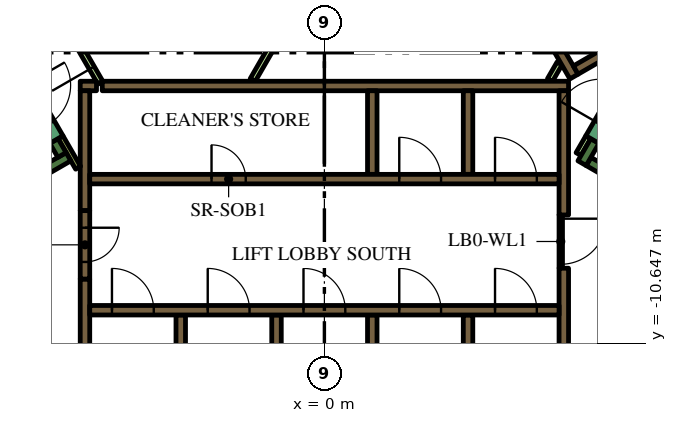
"""IFC4 building model, lengths in metres.
Left out: names, types, materials, properties, quantities, classifications, styles, units other than length and angle.
Written with IfcOpenShell. Run it as: python <this file> out.ifc"""

import sys

from ifc_helpers import new_model, si_unit, direction, frame, frame_2d, origin, place, context, subcontext, project, spatial, polyline, rectangle, outline, extrude, element, fill, save


model = new_model("IFC4")
c1 = context("Model", 3, precision=1e-05, world=origin(), true_north=direction((0.0, 1.0)))
c2 = subcontext(c1, "Body", "Model", "MODEL_VIEW")
j1 = project(units=[si_unit("LENGTHUNIT", "METRE"), si_unit("PLANEANGLEUNIT", "RADIAN")], contexts=[c1])
p1 = place(None, origin())
s1 = spatial("IfcSite", under=j1, at=p1, CompositionType="ELEMENT")
p2 = place(p1, origin())
s2 = spatial("IfcBuilding", under=s1, at=p2, CompositionType="ELEMENT")
p3 = place(p2, frame((0.0, 0.0, 83.7)))
s3 = spatial("IfcBuildingStorey", under=s2, at=p3, CompositionType="ELEMENT", Elevation=83.7)
p4 = place(p3, frame((6.776, 13.364, 0.0), z_axis=(0.0, 0.0, 1.0), x_axis=(0.500004177138, -0.8660229921, 0.0)))
e1 = element("IfcWall", 1, at=p4, inside=s3, PredefinedType="SOLIDWALL", context=c2, shape_type="SweptSolid", body=[
    extrude(rectangle(XDim=20.204, YDim=0.9, at=frame_2d((10.102, 0.0))), origin(), (0.0, 0.0, 1.0), 3.9),
])
p5 = place(p3, frame((12.84, -9.261, 0.0), z_axis=(0.0, 0.0, 1.0), x_axis=(-0.866013990052, 0.500019768644, 0.0)))
e2 = element("IfcWall", 2, at=p5, inside=s3, PredefinedType="SOLIDWALL", context=c2, shape_type="SweptSolid", body=[
    extrude(rectangle(XDim=6.8, YDim=0.25, at=frame_2d((3.4, 0.0))), origin(), (0.0, 0.0, 1.0), 3.9),
])
p6 = place(p3, frame((6.78, -5.906, 0.0), z_axis=(0.0, 0.0, 1.0), x_axis=(0.500223362819, 0.865896406789, 0.0)))
e3 = element("IfcWall", 3, at=p6, inside=s3, PredefinedType="SOLIDWALL", context=c2, shape_type="SweptSolid", body=[
    extrude(rectangle(XDim=0.675, YDim=0.25, at=frame_2d((0.337, 0.0))), origin(), (0.0, 0.0, 1.0), 3.9),
])
p7 = place(p3, frame((-12.84, -9.261, 0.0), z_axis=(0.0, 0.0, 1.0), x_axis=(0.866016039709, 0.500016218704, 0.0)))
e4 = element("IfcWall", 4, at=p7, inside=s3, PredefinedType="SOLIDWALL", context=c2, shape_type="SweptSolid", body=[
    extrude(rectangle(XDim=7.05, YDim=0.25, at=frame_2d((3.525, 0.0))), origin(), (0.0, 0.0, 1.0), 3.9),
])
p8 = place(p3, frame((-6.905, -5.69, 0.0), z_axis=(0.0, 0.0, 1.0), x_axis=(-0.500402024738, 0.865793170242, 0.0)))
e5 = element("IfcWall", 5, at=p8, inside=s3, PredefinedType="SOLIDWALL", context=c2, shape_type="SweptSolid", body=[
    extrude(rectangle(XDim=0.425, YDim=0.25, at=frame_2d((0.212, 0.0))), origin(), (0.0, 0.0, 1.0), 3.9),
])
p9 = place(p3, frame((-3.78, -12.1, 0.0), z_axis=(0.0, 0.0, 1.0), x_axis=(0.0, 1.0, 0.0)))
e6 = element("IfcWall", 6, at=p9, inside=s3, PredefinedType="SOLIDWALL", context=c2, shape_type="SweptSolid", body=[
    extrude(rectangle(XDim=2.2, YDim=0.25, at=frame_2d((1.1, 0.0))), origin(), (0.0, 0.0, 1.0), 3.9),
])
p10 = place(p3, frame((-6.3, -12.1, 0.0), z_axis=(0.0, 0.0, 1.0), x_axis=(0.0, 1.0, 0.0)))
e7 = element("IfcWall", 7, at=p10, inside=s3, PredefinedType="SOLIDWALL", context=c2, shape_type="SweptSolid", body=[
    extrude(rectangle(XDim=3.146, YDim=0.25, at=frame_2d((1.573, 0.0))), origin(), (0.0, 0.0, 1.0), 3.9),
])
p11 = place(p3, frame((-5.845, -3.875, 0.0), z_axis=(0.0, 0.0, 1.0), x_axis=(1.0, 0.0, 0.0)))
e8 = element("IfcWall", 8, at=p11, inside=s3, PredefinedType="SOLIDWALL", context=c2, shape_type="SweptSolid", body=[
    extrude(rectangle(XDim=12.27, YDim=0.25, at=frame_2d((6.135, 0.0))), origin(), (0.0, 0.0, 1.0), 3.9),
])
p12 = place(p3, frame((-6.425, -3.875, 0.0), z_axis=(0.0, 0.0, 1.0), x_axis=(1.0, 0.0, 0.0)))
e9 = element("IfcWall", 9, at=p12, inside=s3, PredefinedType="SOLIDWALL", context=c2, shape_type="SweptSolid", body=[
    extrude(rectangle(XDim=0.428, YDim=0.25, at=frame_2d((0.214, 0.0))), origin(), (0.0, 0.0, 1.0), 3.9),
])
p13 = place(p3, frame((6.3, -8.67, 0.0), z_axis=(0.0, 0.0, 1.0), x_axis=(0.0, -1.0, 0.0)))
e10 = element("IfcWall", 10, at=p13, inside=s3, PredefinedType="SOLIDWALL", context=c2, shape_type="SweptSolid", body=[
    extrude(rectangle(XDim=3.43, YDim=0.25, at=frame_2d((1.715, 0.0))), origin(), (0.0, 0.0, 1.0), 3.9),
])
p14 = place(p3, frame((6.3, -7.268, 0.0), z_axis=(0.0, 0.0, 1.0), x_axis=(0.0, 1.0, 0.0)))
e11 = element("IfcWall", 11, at=p14, inside=s3, PredefinedType="SOLIDWALL", context=c2, shape_type="SweptSolid", body=[
    extrude(rectangle(XDim=3.268, YDim=0.25, at=frame_2d((1.634, 0.0))), origin(), (0.0, 0.0, 1.0), 3.9),
])
for number, where, z_axis, x_axis in (
    (12, (3.78, -4.0, 0.0), (0.0, 0.0, 1.0), (0.0, -1.0, 0.0)),
    (13, (1.26, -4.0, 0.0), (0.0, 0.0, 1.0), (0.0, -1.0, 0.0)),
):
    element("IfcWall", number, at=place(p3, frame(where, z_axis=z_axis, x_axis=x_axis)), inside=s3, PredefinedType="SOLIDWALL", context=c2, shape_type="SweptSolid", body=[
        extrude(rectangle(XDim=2.2, YDim=0.25, at=frame_2d((1.1, 0.0))), origin(), (0.0, 0.0, 1.0), 3.9),
    ])
p15 = place(p3, frame((-6.3, -4.0, 0.0), z_axis=(0.0, 0.0, 1.0), x_axis=(0.0, -1.0, 0.0)))
e14 = element("IfcWall", 14, at=p15, inside=s3, PredefinedType="SOLIDWALL", context=c2, shape_type="SweptSolid", body=[
    extrude(rectangle(XDim=3.154, YDim=0.25, at=frame_2d((1.577, 0.0))), origin(), (0.0, 0.0, 1.0), 3.9),
])
for number, where, z_axis, x_axis in (
    (15, (3.78, -12.1, 0.0), (0.0, 0.0, 1.0), (0.0, 1.0, 0.0)),
    (16, (1.26, -12.1, 0.0), (0.0, 0.0, 1.0), (0.0, 1.0, 0.0)),
    (17, (-1.26, -12.1, 0.0), (0.0, 0.0, 1.0), (0.0, 1.0, 0.0)),
):
    element("IfcWall", number, at=place(p3, frame(where, z_axis=z_axis, x_axis=x_axis)), inside=s3, PredefinedType="SOLIDWALL", context=c2, shape_type="SweptSolid", body=[
        extrude(rectangle(XDim=2.2, YDim=0.25, at=frame_2d((1.1, 0.0))), origin(), (0.0, 0.0, 1.0), 3.9),
    ])
p16 = place(p3, origin())
e18 = element("IfcWall", 18, at=p16, inside=s3, PredefinedType="SOLIDWALL", context=c2, shape_type="SweptSolid", body=[
    extrude(outline(polyline([(0.335, 6.925), (0.335, 7.075), (0.335, 7.075), (0.335, 7.075), (0.245, 7.075), (0.079, 7.363), (0.035, 7.439), (0.252, 7.564), (0.377, 7.348), (6.552, -3.348), (6.677, -3.564), (6.46, -3.689), (4.897, -0.981), (0.332, 6.925), (0.335, 6.925), (0.335, 6.925), (0.335, 6.925)])), origin(), (0.0, 0.0, 1.0), 3.9),
])
p17 = place(p3, frame((6.614, -3.456, 0.0), z_axis=(0.0, 0.0, 1.0), x_axis=(0.86602447079, 0.500001615989, 0.0)))
e19 = element("IfcWall", 19, at=p17, inside=s3, PredefinedType="SOLIDWALL", context=c2, shape_type="SweptSolid", body=[
    extrude(rectangle(XDim=3.154, YDim=0.25, at=frame_2d((1.577, 0.0))), origin(), (0.0, 0.0, 1.0), 3.9),
])
p18 = place(p3, frame((-6.48, -6.027, 0.0), z_axis=(0.0, 0.0, 1.0), x_axis=(-0.499927229454, 0.866067413802, 0.0)))
e20 = element("IfcWall", 20, at=p18, inside=s3, PredefinedType="PARTITIONING", context=c2, shape_type="SweptSolid", body=[
    extrude(rectangle(XDim=0.929, YDim=0.15, at=frame_2d((0.464, 0.0))), origin(), (0.0, 0.0, 1.0), 3.9),
])
p19 = place(p3, frame((6.945, -5.222, 0.0), z_axis=(0.0, 0.0, 1.0), x_axis=(-0.499818422106, -0.866130212453, 0.0)))
e21 = element("IfcWall", 21, at=p19, inside=s3, PredefinedType="PARTITIONING", context=c2, shape_type="SweptSolid", body=[
    extrude(rectangle(XDim=0.514, YDim=0.15, at=frame_2d((0.257, 0.0))), origin(), (0.0, 0.0, 1.0), 2.75),
])
p20 = place(p3, frame((5.936, -3.718, 0.0), z_axis=(0.0, 0.0, 1.0), x_axis=(0.499890179513, 0.866088799389, 0.0)))
e22 = element("IfcWall", 22, at=p20, inside=s3, PredefinedType="PARTITIONING", context=c2, shape_type="SweptSolid", body=[
    extrude(rectangle(XDim=0.504, YDim=0.15, at=frame_2d((0.252, 0.0))), origin(), (0.0, 0.0, 1.0), 2.75),
])
p21 = place(p3, frame((-1.887, -3.718, 0.0), z_axis=(0.0, 0.0, 1.0), x_axis=(0.500033287521, 0.866006184372, 0.0)))
e23 = element("IfcWall", 23, at=p21, inside=s3, PredefinedType="PARTITIONING", context=c2, shape_type="SweptSolid", body=[
    extrude(rectangle(XDim=3.263, YDim=0.15, at=frame_2d((1.632, 0.0))), origin(), (0.0, 0.0, 1.0), 2.75),
])
p22 = place(p3, frame((-6.175, -9.775, 0.0), z_axis=(0.0, 0.0, 1.0), x_axis=(1.0, 0.0, 0.0)))
e24 = element("IfcWall", 24, at=p22, inside=s3, PredefinedType="SOLIDWALL", context=c2, shape_type="SweptSolid", body=[
    extrude(rectangle(XDim=12.35, YDim=0.25, at=frame_2d((6.175, 0.0))), origin(), (0.0, 0.0, 1.0), 3.9),
])
p23 = place(p22, frame((0.585, 0.0, 0.0)))
e25 = element("IfcOpeningElement", 25, at=p23, cuts=e24, PredefinedType="OPENING", context=c2, shape_type="SweptSolid", body=[
    extrude(rectangle(XDim=1.1, YDim=2.1, at=frame_2d((0.55, 1.05))), frame((0.0, 0.135, 0.0), z_axis=(0.0, -1.0, 0.0), x_axis=(1.0, 0.0, 0.0)), (0.0, 0.0, 1.0), 0.27),
])
p24 = place(p22, frame((3.105, 0.0, 0.0)))
e26 = element("IfcOpeningElement", 26, at=p24, cuts=e24, PredefinedType="OPENING", context=c2, shape_type="SweptSolid", body=[
    extrude(rectangle(XDim=1.1, YDim=2.1, at=frame_2d((0.55, 1.05))), frame((0.0, 0.135, 0.0), z_axis=(0.0, -1.0, 0.0), x_axis=(1.0, 0.0, 0.0)), (0.0, 0.0, 1.0), 0.27),
])
p25 = place(p22, frame((5.625, 0.0, 0.0)))
e27 = element("IfcOpeningElement", 27, at=p25, cuts=e24, PredefinedType="OPENING", context=c2, shape_type="SweptSolid", body=[
    extrude(rectangle(XDim=1.1, YDim=2.1, at=frame_2d((0.55, 1.05))), frame((0.0, 0.135, 0.0), z_axis=(0.0, -1.0, 0.0), x_axis=(1.0, 0.0, 0.0)), (0.0, 0.0, 1.0), 0.27),
])
p26 = place(p22, frame((8.145, 0.0, 0.0)))
e28 = element("IfcOpeningElement", 28, at=p26, cuts=e24, PredefinedType="OPENING", context=c2, shape_type="SweptSolid", body=[
    extrude(rectangle(XDim=1.1, YDim=2.1, at=frame_2d((0.55, 1.05))), frame((0.0, 0.135, 0.0), z_axis=(0.0, -1.0, 0.0), x_axis=(1.0, 0.0, 0.0)), (0.0, 0.0, 1.0), 0.27),
])
p27 = place(p22, frame((10.665, 0.0, 0.0)))
e29 = element("IfcOpeningElement", 29, at=p27, cuts=e24, PredefinedType="OPENING", context=c2, shape_type="SweptSolid", body=[
    extrude(rectangle(XDim=1.1, YDim=2.1, at=frame_2d((0.55, 1.05))), frame((0.0, 0.135, 0.0), z_axis=(0.0, -1.0, 0.0), x_axis=(1.0, 0.0, 0.0)), (0.0, 0.0, 1.0), 0.27),
])
p28 = place(p3, frame((-6.175, -6.325, 0.0), z_axis=(0.0, 0.0, 1.0), x_axis=(1.0, 0.0, 0.0)))
e30 = element("IfcWall", 30, at=p28, inside=s3, PredefinedType="SOLIDWALL", context=c2, shape_type="SweptSolid", body=[
    extrude(rectangle(XDim=12.35, YDim=0.25, at=frame_2d((6.175, 0.0))), origin(), (0.0, 0.0, 1.0), 3.9),
])
p29 = place(p28, frame((3.205, 0.0, 0.0)))
e31 = element("IfcOpeningElement", 31, at=p29, cuts=e30, PredefinedType="OPENING", context=c2, shape_type="SweptSolid", body=[
    extrude(rectangle(XDim=0.9, YDim=2.1, at=frame_2d((0.45, 1.05))), frame((0.0, 0.135, 0.0), z_axis=(0.0, -1.0, 0.0), x_axis=(1.0, 0.0, 0.0)), (0.0, 0.0, 1.0), 0.27),
])
p30 = place(p28, frame((8.145, 0.0, 0.0)))
e32 = element("IfcOpeningElement", 32, at=p30, cuts=e30, PredefinedType="OPENING", context=c2, shape_type="SweptSolid", body=[
    extrude(rectangle(XDim=1.1, YDim=2.1, at=frame_2d((0.55, 1.05))), frame((0.0, 0.135, 0.0), z_axis=(0.0, -1.0, 0.0), x_axis=(1.0, 0.0, 0.0)), (0.0, 0.0, 1.0), 0.27),
])
p31 = place(p28, frame((10.665, 0.0, 0.0)))
e33 = element("IfcOpeningElement", 33, at=p31, cuts=e30, PredefinedType="OPENING", context=c2, shape_type="SweptSolid", body=[
    extrude(rectangle(XDim=1.1, YDim=2.1, at=frame_2d((0.55, 1.05))), frame((0.0, 0.135, 0.0), z_axis=(0.0, -1.0, 0.0), x_axis=(1.0, 0.0, 0.0)), (0.0, 0.0, 1.0), 0.27),
])
p32 = place(p3, frame((7.053, -5.284, 0.0), z_axis=(0.0, 0.0, 1.0), x_axis=(0.500078061341, 0.865980330357, 0.0)))
e34 = element("IfcWall", 34, at=p32, inside=s3, PredefinedType="SOLIDWALL", context=c2, shape_type="SweptSolid", body=[
    extrude(rectangle(XDim=2.1, YDim=0.4, at=frame_2d((1.05, 0.0))), origin(), (0.0, 0.0, 1.0), 3.9),
])
p33 = place(p32, frame((0.45, 0.0, 0.0)))
e35 = element("IfcOpeningElement", 35, at=p33, cuts=e34, PredefinedType="OPENING", context=c2, shape_type="SweptSolid", body=[
    extrude(rectangle(XDim=1.2, YDim=2.1, at=frame_2d((0.6, 1.05))), frame((0.0, 0.21, 0.0), z_axis=(0.0, -1.0, 0.0), x_axis=(1.0, 0.0, 0.0)), (0.0, 0.0, 1.0), 0.42),
])
p34 = place(p3, frame((-8.103, -3.466, 0.0), z_axis=(0.0, 0.0, 1.0), x_axis=(0.500078061341, -0.865980330357, 0.0)))
e36 = element("IfcWall", 36, at=p34, inside=s3, PredefinedType="SOLIDWALL", context=c2, shape_type="SweptSolid", body=[
    extrude(rectangle(XDim=2.1, YDim=0.4, at=frame_2d((1.05, 0.0))), origin(), (0.0, 0.0, 1.0), 3.9),
])
p35 = place(p34, frame((0.45, 0.0, 0.0)))
e37 = element("IfcOpeningElement", 37, at=p35, cuts=e36, PredefinedType="OPENING", context=c2, shape_type="SweptSolid", body=[
    extrude(rectangle(XDim=1.2, YDim=2.1, at=frame_2d((0.6, 1.05))), frame((0.0, 0.21, 0.0), z_axis=(0.0, -1.0, 0.0), x_axis=(1.0, 0.0, 0.0)), (0.0, 0.0, 1.0), 0.42),
])
p36 = place(p3, frame((-6.3, -7.154, 0.0), z_axis=(0.0, 0.0, 1.0), x_axis=(0.0, -1.0, 0.0)))
e38 = element("IfcWall", 38, at=p36, inside=s3, PredefinedType="SOLIDWALL", context=c2, shape_type="SweptSolid", body=[
    extrude(rectangle(XDim=1.8, YDim=0.25, at=frame_2d((0.9, 0.0))), origin(), (0.0, 0.0, 1.0), 3.9),
])
p37 = place(p36, frame((0.45, 0.0, 0.0)))
e39 = element("IfcOpeningElement", 39, at=p37, cuts=e38, PredefinedType="OPENING", context=c2, shape_type="SweptSolid", body=[
    extrude(rectangle(XDim=0.9, YDim=2.1, at=frame_2d((0.45, 1.05))), frame((0.0, 0.135, 0.0), z_axis=(0.0, -1.0, 0.0), x_axis=(1.0, 0.0, 0.0)), (0.0, 0.0, 1.0), 0.27),
])
p38 = place(p3, frame((-5.895, -3.79, 0.0), z_axis=(0.0, 0.0, 1.0), x_axis=(-0.49994051562, 0.866059744384, 0.0)))
e40 = element("IfcWall", 40, at=p38, inside=s3, PredefinedType="PARTITIONING", context=c2, shape_type="SweptSolid", body=[
    extrude(rectangle(XDim=2.1, YDim=0.15, at=frame_2d((1.05, 0.0))), origin(), (0.0, 0.0, 1.0), 2.75),
])
p39 = place(p38, frame((0.45, 0.0, 0.0)))
e41 = element("IfcOpeningElement", 41, at=p39, cuts=e40, PredefinedType="OPENING", context=c2, shape_type="SweptSolid", body=[
    extrude(rectangle(XDim=1.2, YDim=2.1, at=frame_2d((0.6, 1.05))), frame((0.0, 0.085, 0.0), z_axis=(0.0, -1.0, 0.0), x_axis=(1.0, 0.0, 0.0)), (0.0, 0.0, 1.0), 0.17),
])
p40 = place(p3, frame((6.22, -7.266, 0.0), z_axis=(0.0, 0.0, 1.0), x_axis=(0.0, -1.0, 0.0)))
e42 = element("IfcWall", 42, at=p40, inside=s3, PredefinedType="PARTITIONING", context=c2, shape_type="SweptSolid", body=[
    extrude(rectangle(XDim=1.4, YDim=0.09, at=frame_2d((0.7, 0.0))), origin(), (0.0, 0.0, 1.0), 2.75),
])
p41 = place(p40, frame((0.1, 0.0, 0.0)))
e43 = element("IfcOpeningElement", 43, at=p41, cuts=e42, PredefinedType="OPENING", context=c2, shape_type="SweptSolid", body=[
    extrude(rectangle(XDim=1.2, YDim=2.1, at=frame_2d((0.6, 1.05))), frame((0.0, 0.055, 0.0), z_axis=(0.0, -1.0, 0.0), x_axis=(1.0, 0.0, 0.0)), (0.0, 0.0, 1.0), 0.11),
])
p42 = place(p3, frame((6.163, 18.475, 0.0), z_axis=(0.0, 0.0, 1.0), x_axis=(0.500001317485, -0.866024643133, 0.0)))
e44 = element("IfcWall", 44, at=p42, inside=s3, PredefinedType="PARTITIONING", context=c2, shape_type="SweptSolid", body=[
    extrude(rectangle(XDim=25.767, YDim=0.15, at=frame_2d((12.883, 0.0))), origin(), (0.0, 0.0, 1.0), 2.75),
])
p43 = place(p42, frame((24.241, 0.0, 0.0)))
e45 = element("IfcOpeningElement", 45, at=p43, cuts=e44, PredefinedType="OPENING", context=c2, shape_type="SweptSolid", body=[
    extrude(rectangle(XDim=1.0, YDim=2.1, at=frame_2d((0.5, 1.05))), frame((0.0, 0.085, 0.0), z_axis=(0.0, -1.0, 0.0), x_axis=(1.0, 0.0, 0.0)), (0.0, 0.0, 1.0), 0.17),
])
p44 = place(p42, frame((13.144, 0.0, 0.0)))
e46 = element("IfcOpeningElement", 46, at=p44, cuts=e44, PredefinedType="OPENING", context=c2, shape_type="SweptSolid", body=[
    extrude(rectangle(XDim=1.0, YDim=2.1, at=frame_2d((0.5, 1.05))), frame((0.0, 0.085, 0.0), z_axis=(0.0, -1.0, 0.0), x_axis=(1.0, 0.0, 0.0)), (0.0, 0.0, 1.0), 0.17),
])
p45 = place(p42, frame((10.874, 0.0, 0.0)))
e47 = element("IfcOpeningElement", 47, at=p45, cuts=e44, PredefinedType="OPENING", context=c2, shape_type="SweptSolid", body=[
    extrude(rectangle(XDim=0.9, YDim=2.1, at=frame_2d((0.45, 1.05))), frame((0.0, 0.085, 0.0), z_axis=(0.0, -1.0, 0.0), x_axis=(1.0, 0.0, 0.0)), (0.0, 0.0, 1.0), 0.17),
])
p46 = place(p42, frame((3.718, 0.0, 0.0)))
e48 = element("IfcOpeningElement", 48, at=p46, cuts=e44, PredefinedType="OPENING", context=c2, shape_type="SweptSolid", body=[
    extrude(rectangle(XDim=1.1, YDim=2.1, at=frame_2d((0.55, 1.05))), frame((0.0, 0.085, 0.0), z_axis=(0.0, -1.0, 0.0), x_axis=(1.0, 0.0, 0.0)), (0.0, 0.0, 1.0), 0.17),
])
p47 = place(p42, frame((2.411, 0.0, 0.0)))
e49 = element("IfcOpeningElement", 49, at=p47, cuts=e44, PredefinedType="OPENING", context=c2, shape_type="SweptSolid", body=[
    extrude(rectangle(XDim=1.0, YDim=2.1, at=frame_2d((0.5, 1.05))), frame((0.0, 0.085, 0.0), z_axis=(0.0, -1.0, 0.0), x_axis=(1.0, 0.0, 0.0)), (0.0, 0.0, 1.0), 0.17),
])
p48 = place(p3, frame((-19.081, -3.9, 0.0), z_axis=(0.0, 0.0, 1.0), x_axis=(0.499998313975, 0.866026377209, 0.0)))
e50 = element("IfcWall", 50, at=p48, inside=s3, PredefinedType="PARTITIONING", context=c2, shape_type="SweptSolid", body=[
    extrude(rectangle(XDim=25.766, YDim=0.15, at=frame_2d((12.883, 0.0))), origin(), (0.0, 0.0, 1.0), 2.75),
])
p49 = place(p48, frame((19.306, 0.0, 0.0)))
e51 = element("IfcOpeningElement", 51, at=p49, cuts=e50, PredefinedType="OPENING", context=c2, shape_type="SweptSolid", body=[
    extrude(rectangle(XDim=1.0, YDim=2.1, at=frame_2d((0.5, 1.05))), frame((0.0, 0.085, 0.0), z_axis=(0.0, -1.0, 0.0), x_axis=(1.0, 0.0, 0.0)), (0.0, 0.0, 1.0), 0.17),
])
p50 = place(p48, frame((18.0, 0.0, 0.0)))
e52 = element("IfcOpeningElement", 52, at=p50, cuts=e50, PredefinedType="OPENING", context=c2, shape_type="SweptSolid", body=[
    extrude(rectangle(XDim=1.0, YDim=2.1, at=frame_2d((0.5, 1.05))), frame((0.0, 0.085, 0.0), z_axis=(0.0, -1.0, 0.0), x_axis=(1.0, 0.0, 0.0)), (0.0, 0.0, 1.0), 0.17),
])
p51 = place(p48, frame((10.874, 0.0, 0.0)))
e53 = element("IfcOpeningElement", 53, at=p51, cuts=e50, PredefinedType="OPENING", context=c2, shape_type="SweptSolid", body=[
    extrude(rectangle(XDim=0.9, YDim=2.1, at=frame_2d((0.45, 1.05))), frame((0.0, 0.085, 0.0), z_axis=(0.0, -1.0, 0.0), x_axis=(1.0, 0.0, 0.0)), (0.0, 0.0, 1.0), 0.17),
])
p52 = place(p48, frame((8.548, 0.0, 0.0)))
e54 = element("IfcOpeningElement", 54, at=p52, cuts=e50, PredefinedType="OPENING", context=c2, shape_type="SweptSolid", body=[
    extrude(rectangle(XDim=1.1, YDim=2.1, at=frame_2d((0.55, 1.05))), frame((0.0, 0.085, 0.0), z_axis=(0.0, -1.0, 0.0), x_axis=(1.0, 0.0, 0.0)), (0.0, 0.0, 1.0), 0.17),
])
p53 = place(p48, frame((0.18, 0.0, 0.0)))
e55 = element("IfcOpeningElement", 55, at=p53, cuts=e50, PredefinedType="OPENING", context=c2, shape_type="SweptSolid", body=[
    extrude(rectangle(XDim=1.0, YDim=2.1, at=frame_2d((0.5, 1.05))), frame((0.0, 0.085, 0.0), z_axis=(0.0, -1.0, 0.0), x_axis=(1.0, 0.0, 0.0)), (0.0, 0.0, 1.0), 0.17),
])
p54 = place(p23, origin())
e56 = element("IfcDoor", 56, at=p54, inside=s3, OperationType="DOUBLE_DOOR_SLIDING", PredefinedType="DOOR", context=c2, shape_type="SweptSolid", body=[
    extrude(rectangle(XDim=1.1, YDim=2.1, at=frame_2d((0.55, 1.05))), frame((0.0, 0.025, 0.0), z_axis=(0.0, -1.0, 0.0), x_axis=(1.0, 0.0, 0.0)), (0.0, 0.0, 1.0), 0.05),
])
fill(e25, e56)
p55 = place(p24, origin())
e57 = element("IfcDoor", 57, at=p55, inside=s3, OperationType="DOUBLE_DOOR_SLIDING", PredefinedType="DOOR", context=c2, shape_type="SweptSolid", body=[
    extrude(rectangle(XDim=1.1, YDim=2.1, at=frame_2d((0.55, 1.05))), frame((0.0, 0.025, 0.0), z_axis=(0.0, -1.0, 0.0), x_axis=(1.0, 0.0, 0.0)), (0.0, 0.0, 1.0), 0.05),
])
fill(e26, e57)
p56 = place(p25, origin())
e58 = element("IfcDoor", 58, at=p56, inside=s3, OperationType="DOUBLE_DOOR_SLIDING", PredefinedType="DOOR", context=c2, shape_type="SweptSolid", body=[
    extrude(rectangle(XDim=1.1, YDim=2.1, at=frame_2d((0.55, 1.05))), frame((0.0, 0.025, 0.0), z_axis=(0.0, -1.0, 0.0), x_axis=(1.0, 0.0, 0.0)), (0.0, 0.0, 1.0), 0.05),
])
fill(e27, e58)
p57 = place(p26, origin())
e59 = element("IfcDoor", 59, at=p57, inside=s3, OperationType="DOUBLE_DOOR_SLIDING", PredefinedType="DOOR", context=c2, shape_type="SweptSolid", body=[
    extrude(rectangle(XDim=1.1, YDim=2.1, at=frame_2d((0.55, 1.05))), frame((0.0, 0.025, 0.0), z_axis=(0.0, -1.0, 0.0), x_axis=(1.0, 0.0, 0.0)), (0.0, 0.0, 1.0), 0.05),
])
fill(e28, e59)
p58 = place(p27, origin())
e60 = element("IfcDoor", 60, at=p58, inside=s3, OperationType="DOUBLE_DOOR_SLIDING", PredefinedType="DOOR", context=c2, shape_type="SweptSolid", body=[
    extrude(rectangle(XDim=1.1, YDim=2.1, at=frame_2d((0.55, 1.05))), frame((0.0, 0.025, 0.0), z_axis=(0.0, -1.0, 0.0), x_axis=(1.0, 0.0, 0.0)), (0.0, 0.0, 1.0), 0.05),
])
fill(e29, e60)
p59 = place(p29, origin())
e61 = element("IfcDoor", 61, at=p59, inside=s3, OperationType="SINGLE_SWING_LEFT", PredefinedType="DOOR", context=c2, shape_type="SweptSolid", body=[
    extrude(rectangle(XDim=0.9, YDim=2.1, at=frame_2d((0.45, 1.05))), frame((0.0, 0.025, 0.0), z_axis=(0.0, -1.0, 0.0), x_axis=(1.0, 0.0, 0.0)), (0.0, 0.0, 1.0), 0.05),
])
fill(e31, e61)
p60 = place(p30, origin())
e62 = element("IfcDoor", 62, at=p60, inside=s3, OperationType="DOUBLE_DOOR_SLIDING", PredefinedType="DOOR", context=c2, shape_type="SweptSolid", body=[
    extrude(rectangle(XDim=1.1, YDim=2.1, at=frame_2d((0.55, 1.05))), frame((0.0, 0.025, 0.0), z_axis=(0.0, -1.0, 0.0), x_axis=(1.0, 0.0, 0.0)), (0.0, 0.0, 1.0), 0.05),
])
fill(e32, e62)
p61 = place(p31, origin())
e63 = element("IfcDoor", 63, at=p61, inside=s3, OperationType="DOUBLE_DOOR_SLIDING", PredefinedType="DOOR", context=c2, shape_type="SweptSolid", body=[
    extrude(rectangle(XDim=1.1, YDim=2.1, at=frame_2d((0.55, 1.05))), frame((0.0, 0.025, 0.0), z_axis=(0.0, -1.0, 0.0), x_axis=(1.0, 0.0, 0.0)), (0.0, 0.0, 1.0), 0.05),
])
fill(e33, e63)
p62 = place(p37, origin())
e64 = element("IfcDoor", 64, at=p62, inside=s3, OperationType="SINGLE_SWING_LEFT", PredefinedType="DOOR", context=c2, shape_type="SweptSolid", body=[
    extrude(rectangle(XDim=0.9, YDim=2.1, at=frame_2d((0.45, 1.05))), frame((0.0, 0.025, 0.0), z_axis=(0.0, -1.0, 0.0), x_axis=(1.0, 0.0, 0.0)), (0.0, 0.0, 1.0), 0.05),
])
fill(e39, e64)
p63 = place(p39, origin())
e65 = element("IfcDoor", 65, at=p63, inside=s3, OperationType="SINGLE_SWING_LEFT", PredefinedType="DOOR", context=c2, shape_type="SweptSolid", body=[
    extrude(rectangle(XDim=1.2, YDim=2.1, at=frame_2d((0.6, 1.05))), frame((0.0, 0.025, 0.0), z_axis=(0.0, -1.0, 0.0), x_axis=(1.0, 0.0, 0.0)), (0.0, 0.0, 1.0), 0.05),
])
fill(e41, e65)
p64 = place(p41, origin())
e66 = element("IfcDoor", 66, at=p64, inside=s3, OperationType="SINGLE_SWING_LEFT", PredefinedType="DOOR", context=c2, shape_type="SweptSolid", body=[
    extrude(rectangle(XDim=1.2, YDim=2.1, at=frame_2d((0.6, 1.05))), frame((0.0, 0.025, 0.0), z_axis=(0.0, -1.0, 0.0), x_axis=(1.0, 0.0, 0.0)), (0.0, 0.0, 1.0), 0.05),
])
fill(e43, e66)
save(model, sys.argv[1])
